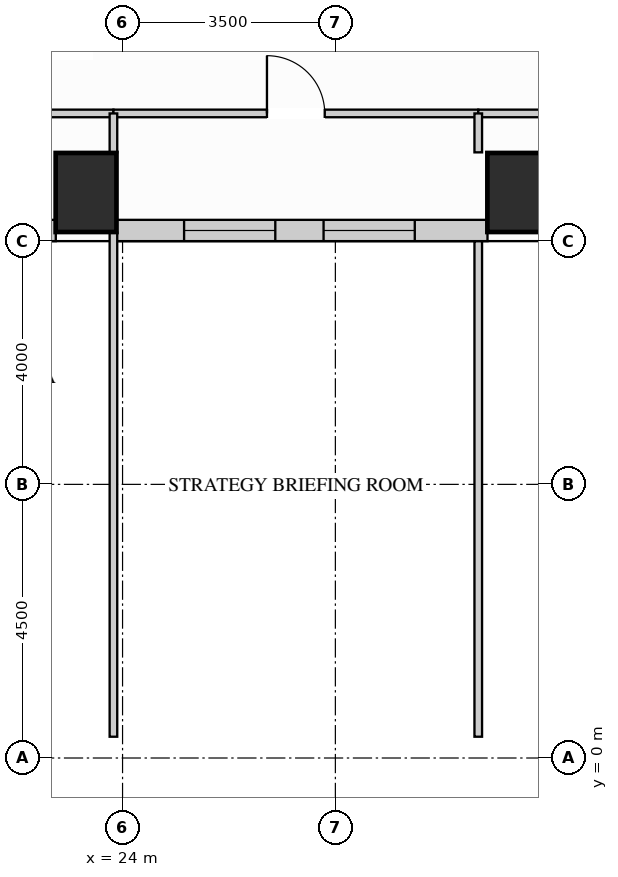
"""IFC4 building model, lengths in metres.
Left out: names, types, materials, properties, quantities, classifications, styles, units other than length and angle.
Written with IfcOpenShell. Run it as: python <this file> out.ifc"""

import sys

from ifc_helpers import new_model, si_unit, direction, frame, frame_2d, origin, origin_2d, place, context, subcontext, project, spatial, rectangle, extrude, source, transform, mapped, element, fill, save


model = new_model("IFC4")
c1 = context("Model", 3, precision=1e-05, world=origin(), true_north=direction((0.0, 1.0)))
c2 = subcontext(c1, "Body", "Model", "MODEL_VIEW")
j1 = project(units=[si_unit("LENGTHUNIT", "METRE"), si_unit("PLANEANGLEUNIT", "RADIAN")], contexts=[c1])
p1 = place(None, origin())
s1 = spatial("IfcSite", under=j1, at=p1, CompositionType="ELEMENT")
p2 = place(p1, origin())
s2 = spatial("IfcBuilding", under=s1, at=p2, CompositionType="ELEMENT")
p3 = place(p2, frame((0.0, 0.0, 51.3)))
s3 = spatial("IfcBuildingStorey", under=s2, at=p3, CompositionType="ELEMENT", Elevation=51.3)
m1 = source(origin(), c2, "Body", "SweptSolid", [
    extrude(rectangle(XDim=1.0, YDim=1.3, at=origin_2d()), origin(), (0.0, 0.0, 1.0), 3.38),
])
for number, where, z_axis, x_axis in (
    (1, (23.4, 9.3, 0.0), (0.0, 0.0, 1.0), (1.0, 0.0, 0.0)),
    (2, (30.5, 9.3, 0.0), (0.0, 0.0, 1.0), (1.0, 0.0, 0.0)),
):
    element("IfcColumn", number, at=place(p3, frame(where, z_axis=z_axis, x_axis=x_axis)), inside=s3, PredefinedType="COLUMN", context=c2, shape_type="MappedRepresentation", body=[
        mapped(m1, transform((0.0, 0.0, 0.0), x_axis=(1.0, 0.0, 0.0), y_axis=(0.0, 1.0, 0.0), z_axis=(0.0, 0.0, 1.0))),
    ])
p4 = place(p3, frame((19.498, 8.675, 0.0), z_axis=(0.0, 0.0, 1.0), x_axis=(1.0, 0.0, 0.0)))
e3 = element("IfcWall", 3, at=p4, inside=s3, PredefinedType="SOLIDWALL", context=c2, shape_type="SweptSolid", body=[
    extrude(rectangle(XDim=3.404, YDim=0.35, at=frame_2d((1.702, 0.0))), origin(), (0.0, 0.0, 1.0), 3.365),
])
p5 = place(p4, frame((0.952, 0.0, 0.78)))
e4 = element("IfcOpeningElement", 4, at=p5, cuts=e3, PredefinedType="OPENING", context=c2, shape_type="SweptSolid", body=[
    extrude(rectangle(XDim=1.5, YDim=2.0, at=frame_2d((0.75, 1.0))), frame((0.0, 0.185, 0.0), z_axis=(0.0, -1.0, 0.0), x_axis=(1.0, 0.0, 0.0)), (0.0, 0.0, 1.0), 0.37),
])
p6 = place(p3, frame((23.898, 8.675, 0.0), z_axis=(0.0, 0.0, 1.0), x_axis=(1.0, 0.0, 0.0)))
e5 = element("IfcWall", 5, at=p6, inside=s3, PredefinedType="SOLIDWALL", context=c2, shape_type="SweptSolid", body=[
    extrude(rectangle(XDim=6.104, YDim=0.35, at=frame_2d((3.052, 0.0))), origin(), (0.0, 0.0, 1.0), 3.365),
])
p7 = place(p6, frame((1.114, 0.0, 0.78)))
e6 = element("IfcOpeningElement", 6, at=p7, cuts=e5, PredefinedType="OPENING", context=c2, shape_type="SweptSolid", body=[
    extrude(rectangle(XDim=1.5, YDim=2.0, at=frame_2d((0.75, 1.0))), frame((0.0, 0.185, 0.0), z_axis=(0.0, -1.0, 0.0), x_axis=(1.0, 0.0, 0.0)), (0.0, 0.0, 1.0), 0.37),
])
p8 = place(p6, frame((3.408, 0.0, 0.78)))
e7 = element("IfcOpeningElement", 7, at=p8, cuts=e5, PredefinedType="OPENING", context=c2, shape_type="SweptSolid", body=[
    extrude(rectangle(XDim=1.5, YDim=2.0, at=frame_2d((0.75, 1.0))), frame((0.0, 0.185, 0.0), z_axis=(0.0, -1.0, 0.0), x_axis=(1.0, 0.0, 0.0)), (0.0, 0.0, 1.0), 0.37),
])
p9 = place(p3, frame((19.5, 10.6, 0.0), z_axis=(0.0, 0.0, 1.0), x_axis=(1.0, 0.0, 0.0)))
e8 = element("IfcWall", 8, at=p9, inside=s3, PredefinedType="PARTITIONING", context=c2, shape_type="SweptSolid", body=[
    extrude(rectangle(XDim=4.35, YDim=0.125, at=frame_2d((2.175, 0.0))), origin(), (0.0, 0.0, 1.0), 3.365),
])
p10 = place(p9, frame((1.7, 0.0, 0.0)))
e9 = element("IfcOpeningElement", 9, at=p10, cuts=e8, PredefinedType="OPENING", context=c2, shape_type="SweptSolid", body=[
    extrude(rectangle(XDim=0.95, YDim=2.15, at=frame_2d((0.475, 1.075))), frame((0.0, 0.073, 0.0), z_axis=(0.0, -1.0, 0.0), x_axis=(1.0, 0.0, 0.0)), (0.0, 0.0, 1.0), 0.145),
])
p11 = place(p3, frame((23.85, 10.6, 0.0), z_axis=(0.0, 0.0, 1.0), x_axis=(1.0, 0.0, 0.0)))
e10 = element("IfcWall", 10, at=p11, inside=s3, PredefinedType="PARTITIONING", context=c2, shape_type="SweptSolid", body=[
    extrude(rectangle(XDim=6.0, YDim=0.125, at=frame_2d((3.0, 0.0))), origin(), (0.0, 0.0, 1.0), 3.365),
])
p12 = place(p11, frame((2.525, 0.0, 0.0)))
e11 = element("IfcOpeningElement", 11, at=p12, cuts=e10, PredefinedType="OPENING", context=c2, shape_type="SweptSolid", body=[
    extrude(rectangle(XDim=0.95, YDim=2.15, at=frame_2d((0.475, 1.075))), frame((0.0, 0.073, 0.0), z_axis=(0.0, -1.0, 0.0), x_axis=(1.0, 0.0, 0.0)), (0.0, 0.0, 1.0), 0.145),
])
p13 = place(p3, frame((29.85, 10.6, 0.0), z_axis=(0.0, 0.0, 1.0), x_axis=(1.0, 0.0, 0.0)))
e12 = element("IfcWall", 12, at=p13, inside=s3, PredefinedType="PARTITIONING", context=c2, shape_type="SweptSolid", body=[
    extrude(rectangle(XDim=4.55, YDim=0.125, at=frame_2d((2.275, 0.0))), origin(), (0.0, 0.0, 1.0), 3.365),
])
p14 = place(p13, frame((1.8, 0.0, 0.0)))
e13 = element("IfcOpeningElement", 13, at=p14, cuts=e12, PredefinedType="OPENING", context=c2, shape_type="SweptSolid", body=[
    extrude(rectangle(XDim=0.95, YDim=2.15, at=frame_2d((0.475, 1.075))), frame((0.0, 0.073, 0.0), z_axis=(0.0, -1.0, 0.0), x_axis=(1.0, 0.0, 0.0)), (0.0, 0.0, 1.0), 0.145),
])
m2 = source(origin(), c2, "Body", "SweptSolid", [
    extrude(rectangle(XDim=8.29, YDim=0.125, at=frame_2d((4.145, 0.0))), origin(), (0.0, 0.0, 1.0), 3.365),
])
p15 = place(p3, frame((23.85, 0.35, 0.0), z_axis=(0.0, 0.0, 1.0), x_axis=(0.0, 1.0, 0.0)))
e14 = element("IfcWall", 14, at=p15, inside=s3, PredefinedType="PARTITIONING", context=c2, shape_type="MappedRepresentation", body=[
    mapped(m2, transform((0.0, 0.0, 0.0), x_axis=(1.0, 0.0, 0.0), y_axis=(0.0, 1.0, 0.0), z_axis=(0.0, 0.0, 1.0))),
])
m3 = source(origin(), c2, "Body", "SweptSolid", [
    extrude(rectangle(XDim=0.64, YDim=0.125, at=frame_2d((0.32, 0.0))), origin(), (0.0, 0.0, 1.0), 3.365),
])
p16 = place(p3, frame((23.85, 9.96, 0.0), z_axis=(0.0, 0.0, 1.0), x_axis=(0.0, 1.0, 0.0)))
e15 = element("IfcWall", 15, at=p16, inside=s3, PredefinedType="PARTITIONING", context=c2, shape_type="MappedRepresentation", body=[
    mapped(m3, transform((0.0, 0.0, 0.0), x_axis=(1.0, 0.0, 0.0), y_axis=(0.0, 1.0, 0.0), z_axis=(0.0, 0.0, 1.0))),
])
m4 = source(origin(), c2, "Body", "SweptSolid", [
    extrude(rectangle(XDim=8.148, YDim=0.125, at=frame_2d((4.074, 0.0))), origin(), (0.0, 0.0, 1.0), 3.365),
])
p17 = place(p3, frame((29.85, 0.35, 0.0), z_axis=(0.0, 0.0, 1.0), x_axis=(0.0, 1.0, 0.0)))
e16 = element("IfcWall", 16, at=p17, inside=s3, PredefinedType="PARTITIONING", context=c2, shape_type="MappedRepresentation", body=[
    mapped(m4, transform((0.0, 0.0, 0.0), x_axis=(1.0, 0.0, 0.0), y_axis=(0.0, 1.0, 0.0), z_axis=(0.0, 0.0, 1.0))),
])
p18 = place(p3, frame((29.85, 9.96, 0.0), z_axis=(0.0, 0.0, 1.0), x_axis=(0.0, 1.0, 0.0)))
e17 = element("IfcWall", 17, at=p18, inside=s3, PredefinedType="PARTITIONING", context=c2, shape_type="MappedRepresentation", body=[
    mapped(m3, transform((0.0, 0.0, 0.0), x_axis=(1.0, 0.0, 0.0), y_axis=(0.0, 1.0, 0.0), z_axis=(0.0, 0.0, 1.0))),
])
m5 = source(origin(), c2, "Body", "SweptSolid", [
    extrude(rectangle(XDim=0.95, YDim=2.15, at=frame_2d((0.475, 1.075))), frame((0.0, 0.025, 0.0), z_axis=(0.0, -1.0, 0.0), x_axis=(1.0, 0.0, 0.0)), (0.0, 0.0, 1.0), 0.05),
])
p19 = place(p12, origin())
e18 = element("IfcDoor", 18, at=p19, inside=s3, OperationType="SINGLE_SWING_LEFT", PredefinedType="DOOR", context=c2, shape_type="MappedRepresentation", body=[
    mapped(m5, transform((0.0, 0.0, 0.0), x_axis=(1.0, 0.0, 0.0), y_axis=(0.0, 1.0, 0.0), z_axis=(0.0, 0.0, 1.0))),
])
fill(e11, e18)
m6 = source(origin(), c2, "Body", "SweptSolid", [
    extrude(rectangle(XDim=1.5, YDim=2.0, at=frame_2d((0.75, 1.0))), frame((0.0, 0.03, 0.0), z_axis=(0.0, -1.0, 0.0), x_axis=(1.0, 0.0, 0.0)), (0.0, 0.0, 1.0), 0.06),
])
p20 = place(p7, origin())
e19 = element("IfcWindow", 19, at=p20, inside=s3, PartitioningType="SINGLE_PANEL", PredefinedType="WINDOW", context=c2, shape_type="MappedRepresentation", body=[
    mapped(m6, transform((0.0, 0.0, 0.0), x_axis=(1.0, 0.0, 0.0), y_axis=(0.0, 1.0, 0.0), z_axis=(0.0, 0.0, 1.0))),
])
fill(e6, e19)
p21 = place(p8, origin())
e20 = element("IfcWindow", 20, at=p21, inside=s3, PartitioningType="SINGLE_PANEL", PredefinedType="WINDOW", context=c2, shape_type="MappedRepresentation", body=[
    mapped(m6, transform((0.0, 0.0, 0.0), x_axis=(1.0, 0.0, 0.0), y_axis=(0.0, 1.0, 0.0), z_axis=(0.0, 0.0, 1.0))),
])
fill(e7, e20)
save(model, sys.argv[1])
